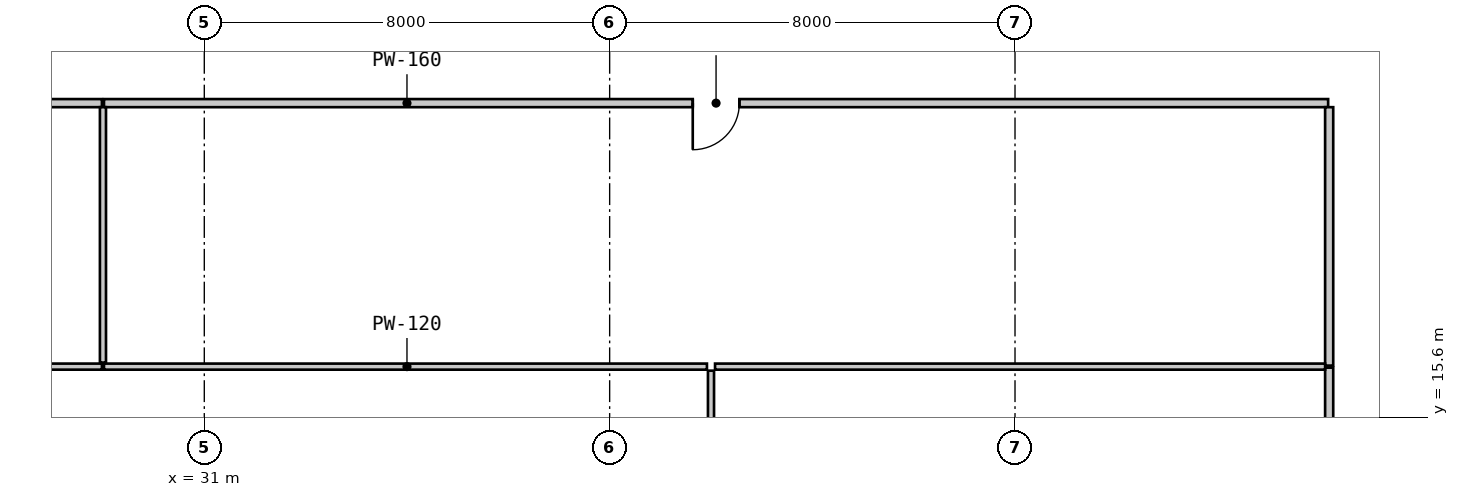
"""IFC4 building model, lengths in metres.
Left out: names, types, materials, properties, quantities, classifications, styles, units other than length and angle.
Written with IfcOpenShell. Run it as: python <this file> out.ifc"""

import sys

from ifc_helpers import new_model, si_unit, direction, frame, frame_2d, origin, place, context, subcontext, project, spatial, rectangle, extrude, source, transform, mapped, element, fill, save


model = new_model("IFC4")
c1 = context("Model", 3, precision=1e-05, world=origin(), true_north=direction((0.0, 1.0)))
c2 = subcontext(c1, "Body", "Model", "MODEL_VIEW")
j1 = project(units=[si_unit("LENGTHUNIT", "METRE"), si_unit("PLANEANGLEUNIT", "RADIAN")], contexts=[c1])
p1 = place(None, origin())
s1 = spatial("IfcSite", under=j1, at=p1, CompositionType="ELEMENT")
p2 = place(p1, origin())
s2 = spatial("IfcBuilding", under=s1, at=p2, CompositionType="ELEMENT")
p3 = place(p2, frame((0.0, 0.0, 26.25)))
s3 = spatial("IfcBuildingStorey", under=s2, at=p3, CompositionType="ELEMENT", Elevation=26.25)
m1 = source(origin(), c2, "Body", "SweptSolid", [
    extrude(rectangle(XDim=5.16, YDim=0.16, at=frame_2d((2.58, 0.0))), origin(), (0.0, 0.0, 1.0), 2.93),
])
p4 = place(p3, frame((53.2, 11.42, 0.0), z_axis=(0.0, 0.0, 1.0), x_axis=(0.0, 1.0, 0.0)))
e1 = element("IfcWall", 1, at=p4, inside=s3, PredefinedType="PARTITIONING", context=c2, shape_type="MappedRepresentation", body=[
    mapped(m1, transform((0.0, 0.0, 0.0), scale=1.0)),
])
m2 = source(origin(), c2, "Body", "SweptSolid", [
    extrude(rectangle(XDim=12.159, YDim=0.16, at=frame_2d((6.08, 0.0))), origin(), (0.0, 0.0, 1.0), 2.93),
])
p5 = place(p3, frame((28.98, 21.8, 0.0), z_axis=(0.0, 0.0, 1.0), x_axis=(-1.0, 0.0, 0.0)))
e2 = element("IfcWall", 2, at=p5, inside=s3, PredefinedType="PARTITIONING", context=c2, shape_type="MappedRepresentation", body=[
    mapped(m2, transform((0.0, 0.0, 0.0), scale=1.0)),
])
m3 = source(origin(), c2, "Body", "SweptSolid", [
    extrude(rectangle(XDim=1.05, YDim=2.1, at=frame_2d((0.525, 1.05))), frame((0.0, 0.09, 0.0), z_axis=(0.0, -1.0, 0.0), x_axis=(1.0, 0.0, 0.0)), (0.0, 0.0, 1.0), 0.18),
])
p6 = place(p5, frame((5.555, 0.0, 0.0)))
e3 = element("IfcOpeningElement", 3, at=p6, cuts=e2, PredefinedType="OPENING", context=c2, shape_type="MappedRepresentation", body=[
    mapped(m3, transform((0.0, 0.0, 0.0), scale=1.0)),
])
m4 = source(origin(), c2, "Body", "SweptSolid", [
    extrude(rectangle(XDim=24.159, YDim=0.16, at=frame_2d((12.08, 0.0))), origin(), (0.0, 0.0, 1.0), 2.93),
])
p7 = place(p3, frame((53.18, 21.8, 0.0), z_axis=(0.0, 0.0, 1.0), x_axis=(-1.0, 0.0, 0.0)))
e4 = element("IfcWall", 4, at=p7, inside=s3, PredefinedType="PARTITIONING", context=c2, shape_type="MappedRepresentation", body=[
    mapped(m4, transform((0.0, 0.0, 0.0), scale=1.0)),
])
m5 = source(origin(), c2, "Body", "SweptSolid", [
    extrude(rectangle(XDim=0.92, YDim=2.1, at=frame_2d((0.46, 1.05))), frame((0.0, 0.09, 0.0), z_axis=(0.0, -1.0, 0.0), x_axis=(1.0, 0.0, 0.0)), (0.0, 0.0, 1.0), 0.18),
])
p8 = place(p7, frame((11.62, 0.0, 0.0)))
e5 = element("IfcOpeningElement", 5, at=p8, cuts=e4, PredefinedType="OPENING", context=c2, shape_type="MappedRepresentation", body=[
    mapped(m5, transform((0.0, 0.0, 0.0), scale=1.0)),
])
m6 = source(origin(), c2, "Body", "SweptSolid", [
    extrude(rectangle(XDim=5.1, YDim=0.16, at=frame_2d((2.55, 0.0))), origin(), (0.0, 0.0, 1.0), 2.93),
])
p9 = place(p3, frame((53.2, 16.62, 0.0), z_axis=(0.0, 0.0, 1.0), x_axis=(0.0, 1.0, 0.0)))
e6 = element("IfcWall", 6, at=p9, inside=s3, PredefinedType="PARTITIONING", context=c2, shape_type="MappedRepresentation", body=[
    mapped(m6, transform((0.0, 0.0, 0.0), scale=1.0)),
])
m7 = source(origin(), c2, "Body", "SweptSolid", [
    extrude(rectangle(XDim=1.104, YDim=0.12, at=frame_2d((0.552, 0.0))), origin(), (0.0, 0.0, 1.0), 2.93),
])
p10 = place(p3, frame((41.0, 16.52, 0.0), z_axis=(0.0, 0.0, 1.0), x_axis=(0.0, -1.0, 0.0)))
e7 = element("IfcWall", 7, at=p10, inside=s3, PredefinedType="PARTITIONING", context=c2, shape_type="MappedRepresentation", body=[
    mapped(m7, transform((0.0, 0.0, 0.0), scale=1.0)),
])
m8 = source(origin(), c2, "Body", "SweptSolid", [
    extrude(rectangle(XDim=12.1, YDim=0.12, at=frame_2d((6.05, 0.0))), origin(), (0.0, 0.0, 1.0), 2.93),
])
p11 = place(p3, frame((16.88, 16.6, 0.0), z_axis=(0.0, 0.0, 1.0), x_axis=(1.0, 0.0, 0.0)))
e8 = element("IfcWall", 8, at=p11, inside=s3, PredefinedType="PARTITIONING", context=c2, shape_type="MappedRepresentation", body=[
    mapped(m8, transform((0.0, 0.0, 0.0), scale=1.0)),
])
m9 = source(origin(), c2, "Body", "SweptSolid", [
    extrude(rectangle(XDim=11.9, YDim=0.12, at=frame_2d((5.95, 0.0))), origin(), (0.0, 0.0, 1.0), 2.93),
])
p12 = place(p3, frame((29.02, 16.6, 0.0), z_axis=(0.0, 0.0, 1.0), x_axis=(1.0, 0.0, 0.0)))
e9 = element("IfcWall", 9, at=p12, inside=s3, PredefinedType="PARTITIONING", context=c2, shape_type="MappedRepresentation", body=[
    mapped(m9, transform((0.0, 0.0, 0.0), scale=1.0)),
])
m10 = source(origin(), c2, "Body", "SweptSolid", [
    extrude(rectangle(XDim=12.04, YDim=0.12, at=frame_2d((6.02, 0.0))), origin(), (0.0, 0.0, 1.0), 2.93),
])
p13 = place(p3, frame((41.08, 16.6, 0.0), z_axis=(0.0, 0.0, 1.0), x_axis=(1.0, 0.0, 0.0)))
e10 = element("IfcWall", 10, at=p13, inside=s3, PredefinedType="PARTITIONING", context=c2, shape_type="MappedRepresentation", body=[
    mapped(m10, transform((0.0, 0.0, 0.0), scale=1.0)),
])
m11 = source(origin(), c2, "Body", "SweptSolid", [
    extrude(rectangle(XDim=5.04, YDim=0.12, at=frame_2d((2.52, 0.0))), origin(), (0.0, 0.0, 1.0), 2.93),
])
p14 = place(p3, frame((29.0, 21.72, 0.0), z_axis=(0.0, 0.0, 1.0), x_axis=(0.0, -1.0, 0.0)))
e11 = element("IfcWall", 11, at=p14, inside=s3, PredefinedType="PARTITIONING", context=c2, shape_type="MappedRepresentation", body=[
    mapped(m11, transform((0.0, 0.0, 0.0), scale=1.0)),
])
m12 = source(origin(), c2, "Body", "SweptSolid", [
    extrude(rectangle(XDim=0.92, YDim=2.1, at=frame_2d((0.46, 1.05))), frame((0.0, 0.025, 0.0), z_axis=(0.0, -1.0, 0.0), x_axis=(1.0, 0.0, 0.0)), (0.0, 0.0, 1.0), 0.05),
])
p15 = place(p8, origin())
e12 = element("IfcDoor", 12, at=p15, inside=s3, OperationType="SINGLE_SWING_RIGHT", PredefinedType="DOOR", context=c2, shape_type="MappedRepresentation", body=[
    mapped(m12, transform((0.0, 0.0, 0.0), scale=1.0)),
])
fill(e5, e12)
save(model, sys.argv[1])
